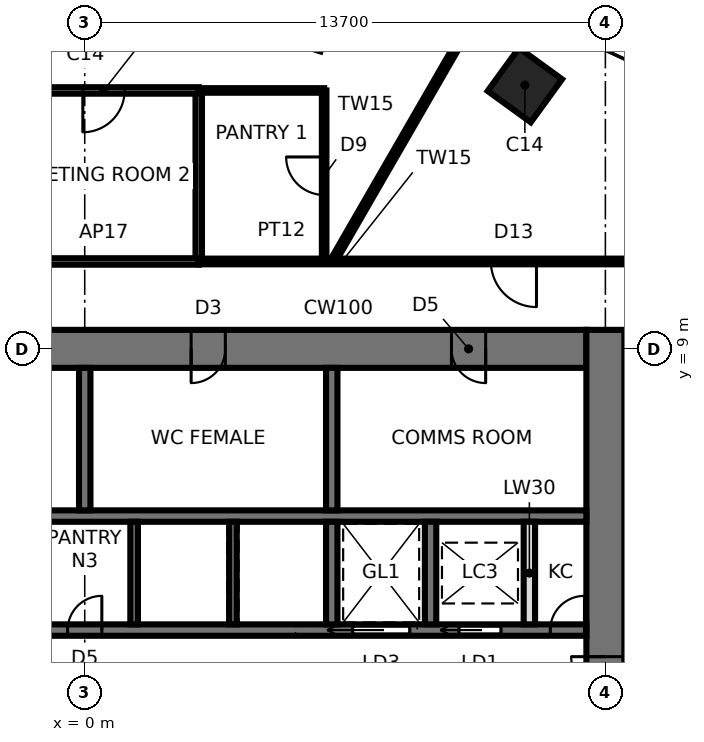
"""IFC4 building model, lengths in metres.
Left out: names, types, materials, properties, quantities, classifications, styles, units other than length and angle.
Written with IfcOpenShell. Run it as: python <this file> out.ifc"""

import sys

from ifc_helpers import new_model, si_unit, direction, frame, frame_2d, origin, origin_2d, place, context, subcontext, project, spatial, rectangle, extrude, element, fill, save


model = new_model("IFC4")
c1 = context("Model", 3, precision=1e-05, world=origin(), true_north=direction((0.0, 1.0)))
c2 = subcontext(c1, "Body", "Model", "MODEL_VIEW")
j1 = project(units=[si_unit("LENGTHUNIT", "METRE"), si_unit("PLANEANGLEUNIT", "RADIAN")], contexts=[c1])
p1 = place(None, origin())
s1 = spatial("IfcSite", under=j1, at=p1, CompositionType="ELEMENT")
p2 = place(p1, origin())
s2 = spatial("IfcBuilding", under=s1, at=p2, CompositionType="ELEMENT")
p3 = place(p2, frame((0.0, 0.0, 195.5)))
s3 = spatial("IfcBuildingStorey", under=s2, at=p3, CompositionType="ELEMENT", Elevation=195.5)
p4 = place(p3, frame((11.581, 15.94, 0.0), z_axis=(0.0, 0.0, 1.0), x_axis=(0.587785252292, 0.809016994375, 0.0)))
e1 = element("IfcColumn", 1, at=p4, inside=s3, PredefinedType="COLUMN", context=c2, shape_type="SweptSolid", body=[
    extrude(rectangle(XDim=1.4, YDim=1.4, at=origin_2d()), origin(), (0.0, 0.0, 1.0), 3.9),
])
p5 = place(p3, frame((13.2, 9.0, 0.0), z_axis=(0.0, 0.0, 1.0), x_axis=(-1.0, 0.0, 0.0)))
e2 = element("IfcWall", 2, at=p5, inside=s3, PredefinedType="SHEAR", context=c2, shape_type="SweptSolid", body=[
    extrude(rectangle(XDim=26.4, YDim=1.0, at=frame_2d((13.2, 0.0))), origin(), (0.0, 0.0, 1.0), 3.9),
])
p6 = place(p5, frame((2.65, 0.0, 0.0)))
e3 = element("IfcOpeningElement", 3, at=p6, cuts=e2, PredefinedType="OPENING", context=c2, shape_type="SweptSolid", body=[
    extrude(rectangle(XDim=0.9, YDim=2.1, at=frame_2d((0.45, 1.05))), frame((0.0, 0.51, 0.0), z_axis=(0.0, -1.0, 0.0), x_axis=(1.0, 0.0, 0.0)), (0.0, 0.0, 1.0), 1.02),
])
p7 = place(p5, frame((9.5, 0.0, 0.0)))
e4 = element("IfcOpeningElement", 4, at=p7, cuts=e2, PredefinedType="OPENING", context=c2, shape_type="SweptSolid", body=[
    extrude(rectangle(XDim=0.9, YDim=2.1, at=frame_2d((0.45, 1.05))), frame((0.0, 0.51, 0.0), z_axis=(0.0, -1.0, 0.0), x_axis=(1.0, 0.0, 0.0)), (0.0, 0.0, 1.0), 1.02),
])
p8 = place(p5, frame((16.0, 0.0, 0.0)))
e5 = element("IfcOpeningElement", 5, at=p8, cuts=e2, PredefinedType="OPENING", context=c2, shape_type="SweptSolid", body=[
    extrude(rectangle(XDim=0.9, YDim=2.1, at=frame_2d((0.45, 1.05))), frame((0.0, 0.51, 0.0), z_axis=(0.0, -1.0, 0.0), x_axis=(1.0, 0.0, 0.0)), (0.0, 0.0, 1.0), 1.02),
])
p9 = place(p5, frame((21.25, 0.0, 0.0)))
e6 = element("IfcOpeningElement", 6, at=p9, cuts=e2, PredefinedType="OPENING", context=c2, shape_type="SweptSolid", body=[
    extrude(rectangle(XDim=0.9, YDim=2.1, at=frame_2d((0.45, 1.05))), frame((0.0, 0.51, 0.0), z_axis=(0.0, -1.0, 0.0), x_axis=(1.0, 0.0, 0.0)), (0.0, 0.0, 1.0), 1.02),
])
p10 = place(p5, frame((24.8, 0.0, 0.0)))
e7 = element("IfcOpeningElement", 7, at=p10, cuts=e2, PredefinedType="OPENING", context=c2, shape_type="SweptSolid", body=[
    extrude(rectangle(XDim=1.0, YDim=2.1, at=frame_2d((0.5, 1.05))), frame((0.0, 0.51, 0.0), z_axis=(0.0, -1.0, 0.0), x_axis=(1.0, 0.0, 0.0)), (0.0, 0.0, 1.0), 1.02),
])
p11 = place(p3, frame((13.7, -9.5, 0.0), z_axis=(0.0, 0.0, 1.0), x_axis=(0.0, 1.0, 0.0)))
e8 = element("IfcWall", 8, at=p11, inside=s3, PredefinedType="SHEAR", context=c2, shape_type="SweptSolid", body=[
    extrude(rectangle(XDim=19.0, YDim=1.0, at=frame_2d((9.5, 0.0))), origin(), (0.0, 0.0, 1.0), 3.9),
])
p12 = place(p11, frame((8.6, 0.0, 0.0)))
e9 = element("IfcOpeningElement", 9, at=p12, cuts=e8, PredefinedType="OPENING", context=c2, shape_type="SweptSolid", body=[
    extrude(rectangle(XDim=1.8, YDim=2.4, at=frame_2d((0.9, 1.2))), frame((0.0, 0.51, 0.0), z_axis=(0.0, -1.0, 0.0), x_axis=(1.0, 0.0, 0.0)), (0.0, 0.0, 1.0), 1.02),
])
p13 = place(p3, frame((-13.2, 1.6, 0.0), z_axis=(0.0, 0.0, 1.0), x_axis=(1.0, 0.0, 0.0)))
e10 = element("IfcWall", 10, at=p13, inside=s3, PredefinedType="SHEAR", context=c2, shape_type="SweptSolid", body=[
    extrude(rectangle(XDim=26.4, YDim=0.3, at=frame_2d((13.2, 0.0))), origin(), (0.0, 0.0, 1.0), 3.9),
])
p14 = place(p13, frame((0.25, 0.0, 0.0)))
e11 = element("IfcOpeningElement", 11, at=p14, cuts=e10, PredefinedType="OPENING", context=c2, shape_type="SweptSolid", body=[
    extrude(rectangle(XDim=1.0, YDim=2.1, at=frame_2d((0.5, 1.05))), frame((0.0, 0.16, 0.0), z_axis=(0.0, -1.0, 0.0), x_axis=(1.0, 0.0, 0.0)), (0.0, 0.0, 1.0), 0.32),
])
p15 = place(p13, frame((23.05, 0.0, 0.0)))
e12 = element("IfcOpeningElement", 12, at=p15, cuts=e10, PredefinedType="OPENING", context=c2, shape_type="SweptSolid", body=[
    extrude(rectangle(XDim=1.1, YDim=2.3, at=frame_2d((0.55, 1.15))), frame((0.0, 0.16, 0.0), z_axis=(0.0, -1.0, 0.0), x_axis=(1.0, 0.0, 0.0)), (0.0, 0.0, 1.0), 0.32),
])
p16 = place(p13, frame((20.25, 0.0, 0.0)))
e13 = element("IfcOpeningElement", 13, at=p16, cuts=e10, PredefinedType="OPENING", context=c2, shape_type="SweptSolid", body=[
    extrude(rectangle(XDim=1.5, YDim=2.4, at=frame_2d((0.75, 1.2))), frame((0.0, 0.16, 0.0), z_axis=(0.0, -1.0, 0.0), x_axis=(1.0, 0.0, 0.0)), (0.0, 0.0, 1.0), 0.32),
])
p17 = place(p13, frame((7.55, 0.0, 0.0)))
e14 = element("IfcOpeningElement", 14, at=p17, cuts=e10, PredefinedType="OPENING", context=c2, shape_type="SweptSolid", body=[
    extrude(rectangle(XDim=0.9, YDim=2.1, at=frame_2d((0.45, 1.05))), frame((0.0, 0.16, 0.0), z_axis=(0.0, -1.0, 0.0), x_axis=(1.0, 0.0, 0.0)), (0.0, 0.0, 1.0), 0.32),
])
p18 = place(p13, frame((10.15, 0.0, 0.0)))
e15 = element("IfcOpeningElement", 15, at=p18, cuts=e10, PredefinedType="OPENING", context=c2, shape_type="SweptSolid", body=[
    extrude(rectangle(XDim=0.9, YDim=2.1, at=frame_2d((0.45, 1.05))), frame((0.0, 0.16, 0.0), z_axis=(0.0, -1.0, 0.0), x_axis=(1.0, 0.0, 0.0)), (0.0, 0.0, 1.0), 0.32),
])
p19 = place(p13, frame((12.75, 0.0, 0.0)))
e16 = element("IfcOpeningElement", 16, at=p19, cuts=e10, PredefinedType="OPENING", context=c2, shape_type="SweptSolid", body=[
    extrude(rectangle(XDim=0.9, YDim=2.1, at=frame_2d((0.45, 1.05))), frame((0.0, 0.16, 0.0), z_axis=(0.0, -1.0, 0.0), x_axis=(1.0, 0.0, 0.0)), (0.0, 0.0, 1.0), 0.32),
])
p20 = place(p13, frame((25.45, 0.0, 0.0)))
e17 = element("IfcOpeningElement", 17, at=p20, cuts=e10, PredefinedType="OPENING", context=c2, shape_type="SweptSolid", body=[
    extrude(rectangle(XDim=0.9, YDim=2.1, at=frame_2d((0.45, 1.05))), frame((0.0, 0.16, 0.0), z_axis=(0.0, -1.0, 0.0), x_axis=(1.0, 0.0, 0.0)), (0.0, 0.0, 1.0), 0.32),
])
p21 = place(p3, frame((-13.2, 4.6, 0.0), z_axis=(0.0, 0.0, 1.0), x_axis=(1.0, 0.0, 0.0)))
e18 = element("IfcWall", 18, at=p21, inside=s3, PredefinedType="SHEAR", context=c2, shape_type="SweptSolid", body=[
    extrude(rectangle(XDim=26.4, YDim=0.3, at=frame_2d((13.2, 0.0))), origin(), (0.0, 0.0, 1.0), 3.9),
])
p22 = place(p3, frame((6.5, 1.75, 0.0), z_axis=(0.0, 0.0, 1.0), x_axis=(0.0, 1.0, 0.0)))
e19 = element("IfcWall", 19, at=p22, inside=s3, PredefinedType="SHEAR", context=c2, shape_type="SweptSolid", body=[
    extrude(rectangle(XDim=2.7, YDim=0.3, at=frame_2d((1.35, 0.0))), origin(), (0.0, 0.0, 1.0), 3.9),
])
p23 = place(p3, frame((6.5, 4.75, 0.0), z_axis=(0.0, 0.0, 1.0), x_axis=(0.0, 1.0, 0.0)))
e20 = element("IfcWall", 20, at=p23, inside=s3, PredefinedType="SHEAR", context=c2, shape_type="SweptSolid", body=[
    extrude(rectangle(XDim=3.75, YDim=0.3, at=frame_2d((1.875, 0.0))), origin(), (0.0, 0.0, 1.0), 3.9),
])
for number, where, z_axis, x_axis in (
    (21, (1.3, 1.75, 0.0), (0.0, 0.0, 1.0), (0.0, 1.0, 0.0)),
    (22, (3.9, 1.75, 0.0), (0.0, 0.0, 1.0), (0.0, 1.0, 0.0)),
):
    element("IfcWall", number, at=place(p3, frame(where, z_axis=z_axis, x_axis=x_axis)), inside=s3, PredefinedType="SHEAR", context=c2, shape_type="SweptSolid", body=[
        extrude(rectangle(XDim=2.7, YDim=0.2, at=frame_2d((1.35, 0.0))), origin(), (0.0, 0.0, 1.0), 3.9),
    ])
p24 = place(p3, frame((0.0, 4.75, 0.0), z_axis=(0.0, 0.0, 1.0), x_axis=(0.0, 1.0, 0.0)))
e23 = element("IfcWall", 23, at=p24, inside=s3, PredefinedType="SHEAR", context=c2, shape_type="SweptSolid", body=[
    extrude(rectangle(XDim=3.75, YDim=0.3, at=frame_2d((1.875, 0.0))), origin(), (0.0, 0.0, 1.0), 3.9),
])
p25 = place(p3, frame((9.1, 1.75, 0.0), z_axis=(0.0, 0.0, 1.0), x_axis=(0.0, 1.0, 0.0)))
e24 = element("IfcWall", 24, at=p25, inside=s3, PredefinedType="SHEAR", context=c2, shape_type="SweptSolid", body=[
    extrude(rectangle(XDim=2.7, YDim=0.3, at=frame_2d((1.35, 0.0))), origin(), (0.0, 0.0, 1.0), 3.9),
])
p26 = place(p3, frame((11.7, 1.75, 0.0), z_axis=(0.0, 0.0, 1.0), x_axis=(0.0, 1.0, 0.0)))
e25 = element("IfcWall", 25, at=p26, inside=s3, PredefinedType="SOLIDWALL", context=c2, shape_type="SweptSolid", body=[
    extrude(rectangle(XDim=2.7, YDim=0.3, at=frame_2d((1.35, 0.0))), origin(), (0.0, 0.0, 1.0), 3.74),
])
p27 = place(p3, frame((16.0, 11.3, 0.0), z_axis=(0.0, 0.0, 1.0), x_axis=(-1.0, 0.0, 0.0)))
e26 = element("IfcWall", 26, at=p27, inside=s3, PredefinedType="PARTITIONING", context=c2, shape_type="SweptSolid", body=[
    extrude(rectangle(XDim=13.0, YDim=0.15, at=frame_2d((6.5, 0.0))), origin(), (0.0, 0.0, 1.0), 3.74),
])
p28 = place(p27, frame((4.113, 0.0, 0.0)))
e27 = element("IfcOpeningElement", 27, at=p28, cuts=e26, PredefinedType="OPENING", context=c2, shape_type="SweptSolid", body=[
    extrude(rectangle(XDim=1.2, YDim=2.4, at=frame_2d((0.6, 1.2))), frame((0.0, 0.085, 0.0), z_axis=(0.0, -1.0, 0.0), x_axis=(1.0, 0.0, 0.0)), (0.0, 0.0, 1.0), 0.17),
])
p29 = place(p3, frame((6.524, 11.3, 0.0), z_axis=(0.0, 0.0, 1.0), x_axis=(0.499985955615, 0.866033512162, 0.0)))
e28 = element("IfcWall", 28, at=p29, inside=s3, PredefinedType="PARTITIONING", context=c2, shape_type="SweptSolid", body=[
    extrude(rectangle(XDim=8.02, YDim=0.15, at=frame_2d((4.01, 0.0))), origin(), (0.0, 0.0, 1.0), 3.74),
])
p30 = place(p3, frame((6.3, 11.3, 0.0), z_axis=(0.0, 0.0, 1.0), x_axis=(0.0, 1.0, 0.0)))
e29 = element("IfcWall", 29, at=p30, inside=s3, PredefinedType="PARTITIONING", context=c2, shape_type="SweptSolid", body=[
    extrude(rectangle(XDim=4.5, YDim=0.12, at=frame_2d((2.25, 0.0))), origin(), (0.0, 0.0, 1.0), 3.74),
])
p31 = place(p30, frame((1.75, 0.0, 0.0)))
e30 = element("IfcOpeningElement", 30, at=p31, cuts=e29, PredefinedType="OPENING", context=c2, shape_type="SweptSolid", body=[
    extrude(rectangle(XDim=1.0, YDim=2.4, at=frame_2d((0.5, 1.2))), frame((0.0, 0.07, 0.0), z_axis=(0.0, -1.0, 0.0), x_axis=(1.0, 0.0, 0.0)), (0.0, 0.0, 1.0), 0.14),
])
p32 = place(p3, frame((6.3, 15.8, 0.0), z_axis=(0.0, 0.0, 1.0), x_axis=(-1.0, 0.0, 0.0)))
e31 = element("IfcWall", 31, at=p32, inside=s3, PredefinedType="PARTITIONING", context=c2, shape_type="SweptSolid", body=[
    extrude(rectangle(XDim=3.3, YDim=0.12, at=frame_2d((1.65, 0.0))), origin(), (0.0, 0.0, 1.0), 3.74),
])
p33 = place(p3, frame((3.0, 15.8, 0.0), z_axis=(0.0, 0.0, 1.0), x_axis=(0.0, -1.0, 0.0)))
e32 = element("IfcWall", 32, at=p33, inside=s3, PredefinedType="PARTITIONING", context=c2, shape_type="SweptSolid", body=[
    extrude(rectangle(XDim=4.5, YDim=0.17, at=frame_2d((2.25, 0.0))), origin(), (0.0, 0.0, 1.0), 3.74),
])
p34 = place(p3, frame((-2.0, 11.3, 0.0), z_axis=(0.0, 0.0, 1.0), x_axis=(1.0, 0.0, 0.0)))
e33 = element("IfcWall", 33, at=p34, inside=s3, PredefinedType="PARTITIONING", context=c2, shape_type="SweptSolid", body=[
    extrude(rectangle(XDim=5.0, YDim=0.17, at=frame_2d((2.5, 0.0))), origin(), (0.0, 0.0, 1.0), 3.74),
])
p35 = place(p3, frame((3.0, 15.8, 0.0), z_axis=(0.0, 0.0, 1.0), x_axis=(-1.0, 0.0, 0.0)))
e34 = element("IfcWall", 34, at=p35, inside=s3, PredefinedType="PARTITIONING", context=c2, shape_type="SweptSolid", body=[
    extrude(rectangle(XDim=5.0, YDim=0.17, at=frame_2d((2.5, 0.0))), origin(), (0.0, 0.0, 1.0), 3.74),
])
p36 = place(p35, frame((1.95, 0.0, 0.0)))
e35 = element("IfcOpeningElement", 35, at=p36, cuts=e34, PredefinedType="OPENING", context=c2, shape_type="SweptSolid", body=[
    extrude(rectangle(XDim=1.1, YDim=2.4, at=frame_2d((0.55, 1.2))), frame((0.0, 0.095, 0.0), z_axis=(0.0, -1.0, 0.0), x_axis=(1.0, 0.0, 0.0)), (0.0, 0.0, 1.0), 0.19),
])
p37 = place(p12, origin())
e36 = element("IfcDoor", 36, at=p37, inside=s3, OperationType="DOUBLE_DOOR_SINGLE_SWING", PredefinedType="DOOR", context=c2, shape_type="SweptSolid", body=[
    extrude(rectangle(XDim=1.72, YDim=2.36, at=frame_2d((0.9, 1.18))), frame((0.0, 0.025, 0.0), z_axis=(0.0, -1.0, 0.0), x_axis=(1.0, 0.0, 0.0)), (0.0, 0.0, 1.0), 0.05),
    extrude(rectangle(XDim=0.04, YDim=2.4, at=frame_2d((0.02, 1.2))), frame((0.0, 0.25, 0.0), z_axis=(0.0, -1.0, 0.0), x_axis=(1.0, 0.0, 0.0)), (0.0, 0.0, 1.0), 0.5),
    extrude(rectangle(XDim=0.04, YDim=2.4, at=frame_2d((1.78, 1.2))), frame((0.0, 0.25, 0.0), z_axis=(0.0, -1.0, 0.0), x_axis=(1.0, 0.0, 0.0)), (0.0, 0.0, 1.0), 0.5),
    extrude(rectangle(XDim=1.72, YDim=0.04, at=frame_2d((0.9, 2.38))), frame((0.0, 0.25, 0.0), z_axis=(0.0, -1.0, 0.0), x_axis=(1.0, 0.0, 0.0)), (0.0, 0.0, 1.0), 0.5),
])
fill(e9, e36)
p38 = place(p15, origin())
e37 = element("IfcDoor", 37, at=p38, inside=s3, OperationType="SLIDING_TO_LEFT", PredefinedType="DOOR", context=c2, shape_type="SweptSolid", body=[
    extrude(rectangle(XDim=1.1, YDim=2.3, at=frame_2d((0.55, 1.15))), frame((0.0, 0.025, 0.0), z_axis=(0.0, -1.0, 0.0), x_axis=(1.0, 0.0, 0.0)), (0.0, 0.0, 1.0), 0.05),
])
fill(e12, e37)
p39 = place(p16, origin())
e38 = element("IfcDoor", 38, at=p39, inside=s3, OperationType="SLIDING_TO_LEFT", PredefinedType="DOOR", context=c2, shape_type="SweptSolid", body=[
    extrude(rectangle(XDim=1.5, YDim=2.4, at=frame_2d((0.75, 1.2))), frame((0.0, 0.025, 0.0), z_axis=(0.0, -1.0, 0.0), x_axis=(1.0, 0.0, 0.0)), (0.0, 0.0, 1.0), 0.05),
])
fill(e13, e38)
p40 = place(p19, origin())
e39 = element("IfcDoor", 39, at=p40, inside=s3, OperationType="SINGLE_SWING_RIGHT", PredefinedType="DOOR", context=c2, shape_type="SweptSolid", body=[
    extrude(rectangle(XDim=0.9, YDim=2.1, at=frame_2d((0.45, 1.05))), frame((0.0, 0.025, 0.0), z_axis=(0.0, -1.0, 0.0), x_axis=(1.0, 0.0, 0.0)), (0.0, 0.0, 1.0), 0.05),
])
fill(e16, e39)
p41 = place(p20, origin())
e40 = element("IfcDoor", 40, at=p41, inside=s3, OperationType="SINGLE_SWING_RIGHT", PredefinedType="DOOR", context=c2, shape_type="SweptSolid", body=[
    extrude(rectangle(XDim=0.9, YDim=2.1, at=frame_2d((0.45, 1.05))), frame((0.0, 0.025, 0.0), z_axis=(0.0, -1.0, 0.0), x_axis=(1.0, 0.0, 0.0)), (0.0, 0.0, 1.0), 0.05),
])
fill(e17, e40)
p42 = place(p6, origin())
e41 = element("IfcDoor", 41, at=p42, inside=s3, OperationType="SINGLE_SWING_LEFT", PredefinedType="DOOR", context=c2, shape_type="SweptSolid", body=[
    extrude(rectangle(XDim=0.82, YDim=2.06, at=frame_2d((0.45, 1.03))), frame((0.0, 0.025, 0.0), z_axis=(0.0, -1.0, 0.0), x_axis=(1.0, 0.0, 0.0)), (0.0, 0.0, 1.0), 0.05),
    extrude(rectangle(XDim=0.04, YDim=2.1, at=frame_2d((0.02, 1.05))), frame((0.0, 0.25, 0.0), z_axis=(0.0, -1.0, 0.0), x_axis=(1.0, 0.0, 0.0)), (0.0, 0.0, 1.0), 0.5),
    extrude(rectangle(XDim=0.04, YDim=2.1, at=frame_2d((0.88, 1.05))), frame((0.0, 0.25, 0.0), z_axis=(0.0, -1.0, 0.0), x_axis=(1.0, 0.0, 0.0)), (0.0, 0.0, 1.0), 0.5),
    extrude(rectangle(XDim=0.82, YDim=0.04, at=frame_2d((0.45, 2.08))), frame((0.0, 0.25, 0.0), z_axis=(0.0, -1.0, 0.0), x_axis=(1.0, 0.0, 0.0)), (0.0, 0.0, 1.0), 0.5),
])
fill(e3, e41)
p43 = place(p7, origin())
e42 = element("IfcDoor", 42, at=p43, inside=s3, OperationType="SINGLE_SWING_RIGHT", PredefinedType="DOOR", context=c2, shape_type="SweptSolid", body=[
    extrude(rectangle(XDim=0.82, YDim=2.06, at=frame_2d((0.45, 1.03))), frame((0.0, 0.025, 0.0), z_axis=(0.0, -1.0, 0.0), x_axis=(1.0, 0.0, 0.0)), (0.0, 0.0, 1.0), 0.05),
    extrude(rectangle(XDim=0.04, YDim=2.1, at=frame_2d((0.02, 1.05))), frame((0.0, 0.25, 0.0), z_axis=(0.0, -1.0, 0.0), x_axis=(1.0, 0.0, 0.0)), (0.0, 0.0, 1.0), 0.5),
    extrude(rectangle(XDim=0.04, YDim=2.1, at=frame_2d((0.88, 1.05))), frame((0.0, 0.25, 0.0), z_axis=(0.0, -1.0, 0.0), x_axis=(1.0, 0.0, 0.0)), (0.0, 0.0, 1.0), 0.5),
    extrude(rectangle(XDim=0.82, YDim=0.04, at=frame_2d((0.45, 2.08))), frame((0.0, 0.25, 0.0), z_axis=(0.0, -1.0, 0.0), x_axis=(1.0, 0.0, 0.0)), (0.0, 0.0, 1.0), 0.5),
])
fill(e4, e42)
p44 = place(p36, origin())
e43 = element("IfcDoor", 43, at=p44, inside=s3, OperationType="SINGLE_SWING_RIGHT", PredefinedType="DOOR", context=c2, shape_type="SweptSolid", body=[
    extrude(rectangle(XDim=1.1, YDim=2.4, at=frame_2d((0.55, 1.2))), frame((0.0, 0.025, 0.0), z_axis=(0.0, -1.0, 0.0), x_axis=(1.0, 0.0, 0.0)), (0.0, 0.0, 1.0), 0.05),
])
fill(e35, e43)
p45 = place(p31, origin())
e44 = element("IfcDoor", 44, at=p45, inside=s3, OperationType="SINGLE_SWING_RIGHT", PredefinedType="DOOR", context=c2, shape_type="SweptSolid", body=[
    extrude(rectangle(XDim=1.0, YDim=2.4, at=frame_2d((0.5, 1.2))), frame((0.0, 0.025, 0.0), z_axis=(0.0, -1.0, 0.0), x_axis=(1.0, 0.0, 0.0)), (0.0, 0.0, 1.0), 0.05),
])
fill(e30, e44)
p46 = place(p28, origin())
e45 = element("IfcDoor", 45, at=p46, inside=s3, OperationType="SINGLE_SWING_LEFT", PredefinedType="DOOR", context=c2, shape_type="SweptSolid", body=[
    extrude(rectangle(XDim=1.2, YDim=2.4, at=frame_2d((0.6, 1.2))), frame((0.0, 0.025, 0.0), z_axis=(0.0, -1.0, 0.0), x_axis=(1.0, 0.0, 0.0)), (0.0, 0.0, 1.0), 0.05),
])
fill(e27, e45)
save(model, sys.argv[1])
